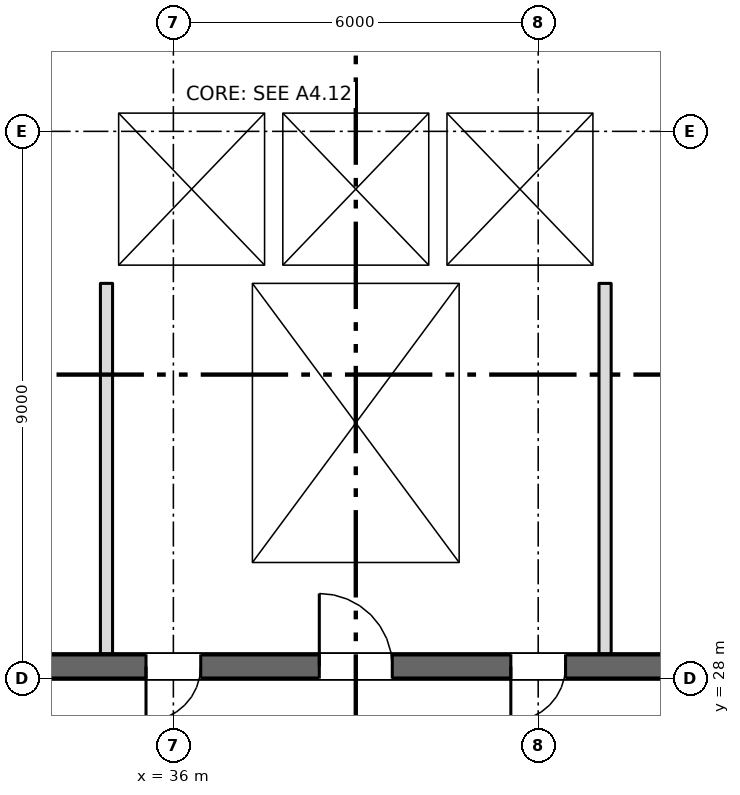
"""IFC4 building model, lengths in metres.
Left out: names, types, materials, properties, quantities, classifications, styles, units other than length and angle.
Written with IfcOpenShell. Run it as: python <this file> out.ifc"""

import sys

from ifc_helpers import new_model, si_unit, direction, frame, frame_2d, origin, place, context, subcontext, project, spatial, rectangle, extrude, element, fill, save


model = new_model("IFC4")
c1 = context("Model", 3, precision=1e-05, world=origin(), true_north=direction((0.0, 1.0)))
c2 = subcontext(c1, "Body", "Model", "MODEL_VIEW")
j1 = project(units=[si_unit("LENGTHUNIT", "METRE"), si_unit("PLANEANGLEUNIT", "RADIAN")], contexts=[c1])
p1 = place(None, origin())
s1 = spatial("IfcSite", under=j1, at=p1, CompositionType="ELEMENT")
p2 = place(p1, origin())
s2 = spatial("IfcBuilding", under=s1, at=p2, CompositionType="ELEMENT")
p3 = place(p2, frame((0.0, 0.0, 78.75)))
s3 = spatial("IfcBuildingStorey", under=s2, at=p3, CompositionType="ELEMENT", Elevation=78.75)
p4 = place(p3, frame((6.7, 28.2, 0.0), z_axis=(0.0, 0.0, 1.0), x_axis=(1.0, 0.0, 0.0)))
e1 = element("IfcWall", 1, at=p4, inside=s3, PredefinedType="SHEAR", context=c2, shape_type="SweptSolid", body=[
    extrude(rectangle(XDim=57.8, YDim=0.4, at=frame_2d((28.9, 0.0))), origin(), (0.0, 0.0, 1.0), 3.35),
])
p5 = place(p4, frame((12.062, 0.0, 0.0)))
e2 = element("IfcOpeningElement", 2, at=p5, cuts=e1, PredefinedType="OPENING", context=c2, shape_type="SweptSolid", body=[
    extrude(rectangle(XDim=0.9, YDim=2.1, at=frame_2d((0.45, 1.05))), frame((0.0, 0.21, 0.0), z_axis=(0.0, -1.0, 0.0), x_axis=(1.0, 0.0, 0.0)), (0.0, 0.0, 1.0), 0.42),
])
p6 = place(p4, frame((14.637, 0.0, 0.0)))
e3 = element("IfcOpeningElement", 3, at=p6, cuts=e1, PredefinedType="OPENING", context=c2, shape_type="SweptSolid", body=[
    extrude(rectangle(XDim=0.9, YDim=2.1, at=frame_2d((0.45, 1.05))), frame((0.0, 0.21, 0.0), z_axis=(0.0, -1.0, 0.0), x_axis=(1.0, 0.0, 0.0)), (0.0, 0.0, 1.0), 0.42),
])
p7 = place(p4, frame((49.062, 0.0, 0.0)))
e4 = element("IfcOpeningElement", 4, at=p7, cuts=e1, PredefinedType="OPENING", context=c2, shape_type="SweptSolid", body=[
    extrude(rectangle(XDim=0.9, YDim=2.1, at=frame_2d((0.45, 1.05))), frame((0.0, 0.21, 0.0), z_axis=(0.0, -1.0, 0.0), x_axis=(1.0, 0.0, 0.0)), (0.0, 0.0, 1.0), 0.42),
])
p8 = place(p4, frame((51.637, 0.0, 0.0)))
e5 = element("IfcOpeningElement", 5, at=p8, cuts=e1, PredefinedType="OPENING", context=c2, shape_type="SweptSolid", body=[
    extrude(rectangle(XDim=0.9, YDim=2.1, at=frame_2d((0.45, 1.05))), frame((0.0, 0.21, 0.0), z_axis=(0.0, -1.0, 0.0), x_axis=(1.0, 0.0, 0.0)), (0.0, 0.0, 1.0), 0.42),
])
p9 = place(p4, frame((1.35, 0.0, 0.0)))
e6 = element("IfcOpeningElement", 6, at=p9, cuts=e1, PredefinedType="OPENING", context=c2, shape_type="SweptSolid", body=[
    extrude(rectangle(XDim=0.9, YDim=2.1, at=frame_2d((0.45, 1.05))), frame((0.0, 0.21, 0.0), z_axis=(0.0, -1.0, 0.0), x_axis=(1.0, 0.0, 0.0)), (0.0, 0.0, 1.0), 0.42),
])
p10 = place(p4, frame((4.7, 0.0, 0.0)))
e7 = element("IfcOpeningElement", 7, at=p10, cuts=e1, PredefinedType="OPENING", context=c2, shape_type="SweptSolid", body=[
    extrude(rectangle(XDim=1.2, YDim=2.1, at=frame_2d((0.6, 1.05))), frame((0.0, 0.21, 0.0), z_axis=(0.0, -1.0, 0.0), x_axis=(1.0, 0.0, 0.0)), (0.0, 0.0, 1.0), 0.42),
])
p11 = place(p4, frame((31.7, 0.0, 0.0)))
e8 = element("IfcOpeningElement", 8, at=p11, cuts=e1, PredefinedType="OPENING", context=c2, shape_type="SweptSolid", body=[
    extrude(rectangle(XDim=1.2, YDim=2.1, at=frame_2d((0.6, 1.05))), frame((0.0, 0.21, 0.0), z_axis=(0.0, -1.0, 0.0), x_axis=(1.0, 0.0, 0.0)), (0.0, 0.0, 1.0), 0.42),
])
p12 = place(p4, frame((55.2, 0.0, 0.0)))
e9 = element("IfcOpeningElement", 9, at=p12, cuts=e1, PredefinedType="OPENING", context=c2, shape_type="SweptSolid", body=[
    extrude(rectangle(XDim=1.2, YDim=2.1, at=frame_2d((0.6, 1.05))), frame((0.0, 0.21, 0.0), z_axis=(0.0, -1.0, 0.0), x_axis=(1.0, 0.0, 0.0)), (0.0, 0.0, 1.0), 0.42),
])
p13 = place(p4, frame((21.7, 0.0, 0.0)))
e10 = element("IfcOpeningElement", 10, at=p13, cuts=e1, PredefinedType="OPENING", context=c2, shape_type="SweptSolid", body=[
    extrude(rectangle(XDim=1.2, YDim=2.1, at=frame_2d((0.6, 1.05))), frame((0.0, 0.21, 0.0), z_axis=(0.0, -1.0, 0.0), x_axis=(1.0, 0.0, 0.0)), (0.0, 0.0, 1.0), 0.42),
])
p14 = place(p4, frame((41.7, 0.0, 0.0)))
e11 = element("IfcOpeningElement", 11, at=p14, cuts=e1, PredefinedType="OPENING", context=c2, shape_type="SweptSolid", body=[
    extrude(rectangle(XDim=1.2, YDim=2.1, at=frame_2d((0.6, 1.05))), frame((0.0, 0.21, 0.0), z_axis=(0.0, -1.0, 0.0), x_axis=(1.0, 0.0, 0.0)), (0.0, 0.0, 1.0), 0.42),
])
p15 = place(p4, frame((24.85, 0.0, 0.0)))
e12 = element("IfcOpeningElement", 12, at=p15, cuts=e1, PredefinedType="OPENING", context=c2, shape_type="SweptSolid", body=[
    extrude(rectangle(XDim=2.4, YDim=2.1, at=frame_2d((1.2, 1.05))), frame((0.0, 0.21, 0.0), z_axis=(0.0, -1.0, 0.0), x_axis=(1.0, 0.0, 0.0)), (0.0, 0.0, 1.0), 0.42),
])
p16 = place(p4, frame((37.35, 0.0, 0.0)))
e13 = element("IfcOpeningElement", 13, at=p16, cuts=e1, PredefinedType="OPENING", context=c2, shape_type="SweptSolid", body=[
    extrude(rectangle(XDim=2.4, YDim=2.1, at=frame_2d((1.2, 1.05))), frame((0.0, 0.21, 0.0), z_axis=(0.0, -1.0, 0.0), x_axis=(1.0, 0.0, 0.0)), (0.0, 0.0, 1.0), 0.42),
])
p17 = place(p4, frame((7.85, 0.0, 0.0)))
e14 = element("IfcOpeningElement", 14, at=p17, cuts=e1, PredefinedType="OPENING", context=c2, shape_type="SweptSolid", body=[
    extrude(rectangle(XDim=2.4, YDim=2.1, at=frame_2d((1.2, 1.05))), frame((0.0, 0.21, 0.0), z_axis=(0.0, -1.0, 0.0), x_axis=(1.0, 0.0, 0.0)), (0.0, 0.0, 1.0), 0.42),
])
p18 = place(p4, frame((28.85, 0.0, 0.0)))
e15 = element("IfcOpeningElement", 15, at=p18, cuts=e1, PredefinedType="OPENING", context=c2, shape_type="SweptSolid", body=[
    extrude(rectangle(XDim=0.9, YDim=2.1, at=frame_2d((0.45, 1.05))), frame((0.0, 0.21, 0.0), z_axis=(0.0, -1.0, 0.0), x_axis=(1.0, 0.0, 0.0)), (0.0, 0.0, 1.0), 0.42),
])
p19 = place(p4, frame((34.85, 0.0, 0.0)))
e16 = element("IfcOpeningElement", 16, at=p19, cuts=e1, PredefinedType="OPENING", context=c2, shape_type="SweptSolid", body=[
    extrude(rectangle(XDim=0.9, YDim=2.1, at=frame_2d((0.45, 1.05))), frame((0.0, 0.21, 0.0), z_axis=(0.0, -1.0, 0.0), x_axis=(1.0, 0.0, 0.0)), (0.0, 0.0, 1.0), 0.42),
])
for number, where, z_axis, x_axis in (
    (17, (37.15, 28.4, 0.0), (0.0, 0.0, 1.0), (0.0, 1.0, 0.0)),
    (18, (40.85, 28.4, 0.0), (0.0, 0.0, 1.0), (0.0, 1.0, 0.0)),
):
    element("IfcWall", number, at=place(p3, frame(where, z_axis=z_axis, x_axis=x_axis)), inside=s3, PredefinedType="SHEAR", context=c2, shape_type="SweptSolid", body=[
        extrude(rectangle(XDim=6.1, YDim=0.3, at=frame_2d((3.05, 0.0))), origin(), (0.0, 0.0, 1.0), 3.35),
    ])
p20 = place(p3, frame((34.8, 34.65, 0.0), z_axis=(0.0, 0.0, 1.0), x_axis=(1.0, 0.0, 0.0)))
e19 = element("IfcWall", 19, at=p20, inside=s3, PredefinedType="SHEAR", context=c2, shape_type="SweptSolid", body=[
    extrude(rectangle(XDim=8.4, YDim=0.3, at=frame_2d((4.2, 0.0))), origin(), (0.0, 0.0, 1.0), 3.35),
])
p21 = place(p3, frame((34.8, 37.45, 0.0), z_axis=(0.0, 0.0, 1.0), x_axis=(1.0, 0.0, 0.0)))
e20 = element("IfcWall", 20, at=p21, inside=s3, PredefinedType="SHEAR", context=c2, shape_type="SweptSolid", body=[
    extrude(rectangle(XDim=8.4, YDim=0.3, at=frame_2d((4.2, 0.0))), origin(), (0.0, 0.0, 1.0), 3.35),
])
p22 = place(p21, frame((0.95, 0.0, 0.0)))
e21 = element("IfcOpeningElement", 21, at=p22, cuts=e20, PredefinedType="OPENING", context=c2, shape_type="SweptSolid", body=[
    extrude(rectangle(XDim=1.1, YDim=2.1, at=frame_2d((0.55, 1.05))), frame((0.0, 0.16, 0.0), z_axis=(0.0, -1.0, 0.0), x_axis=(1.0, 0.0, 0.0)), (0.0, 0.0, 1.0), 0.32),
])
p23 = place(p21, frame((3.65, 0.0, 0.0)))
e22 = element("IfcOpeningElement", 22, at=p23, cuts=e20, PredefinedType="OPENING", context=c2, shape_type="SweptSolid", body=[
    extrude(rectangle(XDim=1.1, YDim=2.1, at=frame_2d((0.55, 1.05))), frame((0.0, 0.16, 0.0), z_axis=(0.0, -1.0, 0.0), x_axis=(1.0, 0.0, 0.0)), (0.0, 0.0, 1.0), 0.32),
])
p24 = place(p21, frame((6.35, 0.0, 0.0)))
e23 = element("IfcOpeningElement", 23, at=p24, cuts=e20, PredefinedType="OPENING", context=c2, shape_type="SweptSolid", body=[
    extrude(rectangle(XDim=1.1, YDim=2.1, at=frame_2d((0.55, 1.05))), frame((0.0, 0.16, 0.0), z_axis=(0.0, -1.0, 0.0), x_axis=(1.0, 0.0, 0.0)), (0.0, 0.0, 1.0), 0.32),
])
for number, where, z_axis, x_axis in (
    (24, (34.95, 34.8, 0.0), (0.0, 0.0, 1.0), (0.0, 1.0, 0.0)),
    (25, (43.05, 34.8, 0.0), (0.0, 0.0, 1.0), (0.0, 1.0, 0.0)),
    (26, (37.65, 34.8, 0.0), (0.0, 0.0, 1.0), (0.0, 1.0, 0.0)),
    (27, (40.35, 34.8, 0.0), (0.0, 0.0, 1.0), (0.0, 1.0, 0.0)),
):
    element("IfcWall", number, at=place(p3, frame(where, z_axis=z_axis, x_axis=x_axis)), inside=s3, PredefinedType="SHEAR", context=c2, shape_type="SweptSolid", body=[
        extrude(rectangle(XDim=2.5, YDim=0.3, at=frame_2d((1.25, 0.0))), origin(), (0.0, 0.0, 1.0), 3.35),
    ])
for number, where, z_axis, x_axis in (
    (28, (34.9, 28.4, 0.0), (0.0, 0.0, 1.0), (0.0, 1.0, 0.0)),
    (29, (43.1, 28.4, 0.0), (0.0, 0.0, 1.0), (0.0, 1.0, 0.0)),
):
    element("IfcWall", number, at=place(p3, frame(where, z_axis=z_axis, x_axis=x_axis)), inside=s3, PredefinedType="PARTITIONING", context=c2, shape_type="SweptSolid", body=[
        extrude(rectangle(XDim=6.1, YDim=0.2, at=frame_2d((3.05, 0.0))), origin(), (0.0, 0.0, 1.0), 3.35),
    ])
p25 = place(p22, origin())
e30 = element("IfcDoor", 30, at=p25, inside=s3, OperationType="SLIDING_TO_LEFT", PredefinedType="DOOR", context=c2, shape_type="SweptSolid", body=[
    extrude(rectangle(XDim=1.1, YDim=2.1, at=frame_2d((0.55, 1.05))), frame((0.0, 0.025, 0.0), z_axis=(0.0, -1.0, 0.0), x_axis=(1.0, 0.0, 0.0)), (0.0, 0.0, 1.0), 0.05),
])
fill(e21, e30)
p26 = place(p23, origin())
e31 = element("IfcDoor", 31, at=p26, inside=s3, OperationType="SLIDING_TO_LEFT", PredefinedType="DOOR", context=c2, shape_type="SweptSolid", body=[
    extrude(rectangle(XDim=1.1, YDim=2.1, at=frame_2d((0.55, 1.05))), frame((0.0, 0.025, 0.0), z_axis=(0.0, -1.0, 0.0), x_axis=(1.0, 0.0, 0.0)), (0.0, 0.0, 1.0), 0.05),
])
fill(e22, e31)
p27 = place(p24, origin())
e32 = element("IfcDoor", 32, at=p27, inside=s3, OperationType="SLIDING_TO_LEFT", PredefinedType="DOOR", context=c2, shape_type="SweptSolid", body=[
    extrude(rectangle(XDim=1.1, YDim=2.1, at=frame_2d((0.55, 1.05))), frame((0.0, 0.025, 0.0), z_axis=(0.0, -1.0, 0.0), x_axis=(1.0, 0.0, 0.0)), (0.0, 0.0, 1.0), 0.05),
])
fill(e23, e32)
p28 = place(p11, origin())
e33 = element("IfcDoor", 33, at=p28, inside=s3, OperationType="SINGLE_SWING_LEFT", PredefinedType="DOOR", context=c2, shape_type="SweptSolid", body=[
    extrude(rectangle(XDim=1.2, YDim=2.1, at=frame_2d((0.6, 1.05))), frame((0.0, 0.025, 0.0), z_axis=(0.0, -1.0, 0.0), x_axis=(1.0, 0.0, 0.0)), (0.0, 0.0, 1.0), 0.05),
])
fill(e8, e33)
p29 = place(p18, origin())
e34 = element("IfcDoor", 34, at=p29, inside=s3, OperationType="SINGLE_SWING_LEFT", PredefinedType="DOOR", context=c2, shape_type="SweptSolid", body=[
    extrude(rectangle(XDim=0.9, YDim=2.1, at=frame_2d((0.45, 1.05))), frame((0.0, 0.025, 0.0), z_axis=(0.0, -1.0, 0.0), x_axis=(1.0, 0.0, 0.0)), (0.0, 0.0, 1.0), 0.05),
])
fill(e15, e34)
p30 = place(p19, origin())
e35 = element("IfcDoor", 35, at=p30, inside=s3, OperationType="SINGLE_SWING_LEFT", PredefinedType="DOOR", context=c2, shape_type="SweptSolid", body=[
    extrude(rectangle(XDim=0.9, YDim=2.1, at=frame_2d((0.45, 1.05))), frame((0.0, 0.025, 0.0), z_axis=(0.0, -1.0, 0.0), x_axis=(1.0, 0.0, 0.0)), (0.0, 0.0, 1.0), 0.05),
])
fill(e16, e35)
save(model, sys.argv[1])
